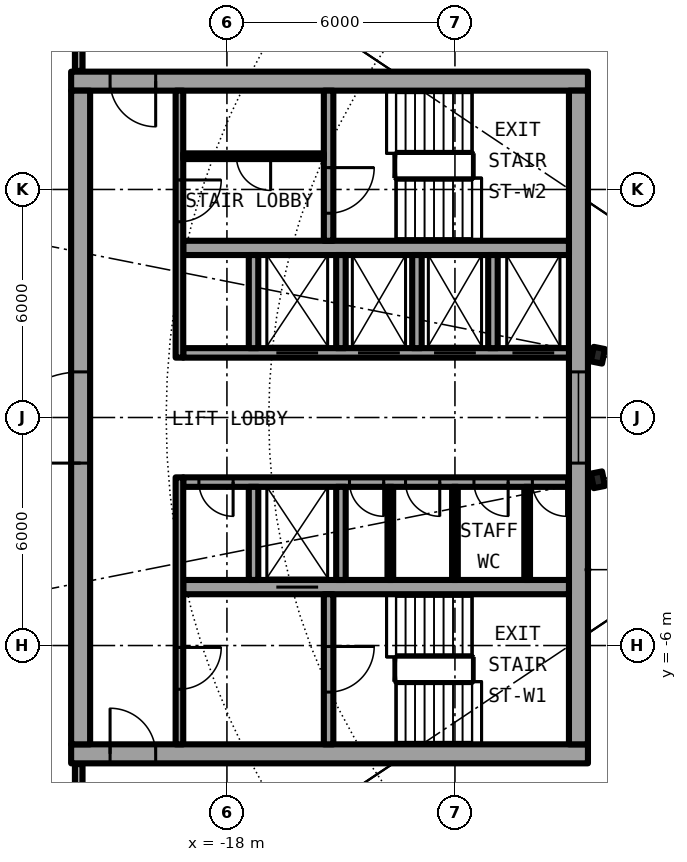
"""IFC4 building model, lengths in metres.
Left out: names, types, materials, properties, quantities, classifications, styles, units other than length and angle.
Written with IfcOpenShell. Run it as: python <this file> out.ifc"""

import sys

from ifc_helpers import new_model, si_unit, direction, frame, frame_2d, origin, origin_2d, place, context, subcontext, project, spatial, rectangle, i_section, extrude, element, fill, save


model = new_model("IFC4")
c1 = context("Model", 3, precision=1e-05, world=origin(), true_north=direction((0.0, 1.0)))
c2 = subcontext(c1, "Body", "Model", "MODEL_VIEW")
j1 = project(units=[si_unit("LENGTHUNIT", "METRE"), si_unit("PLANEANGLEUNIT", "RADIAN")], contexts=[c1])
p1 = place(None, origin())
s1 = spatial("IfcSite", under=j1, at=p1, CompositionType="ELEMENT")
p2 = place(p1, origin())
s2 = spatial("IfcBuilding", under=s1, at=p2, CompositionType="ELEMENT")
p3 = place(p2, frame((0.0, 0.0, 179.9)))
s3 = spatial("IfcBuildingStorey", under=s2, at=p3, CompositionType="ELEMENT", Elevation=179.9)
for number, where, z_axis, x_axis in (
    (1, (-8.239, 1.639, 0.0), (0.0, 0.0, 1.0), (-0.981, 0.195, 0.0)),
    (2, (-8.239, -1.639, 0.0), (0.0, 0.0, 1.0), (-0.981, -0.195, 0.0)),
):
    element("IfcColumn", number, at=place(p3, frame(where, z_axis=z_axis, x_axis=x_axis)), inside=s3, PredefinedType="COLUMN", context=c2, shape_type="SweptSolid", body=[
        extrude(i_section(OverallWidth=0.3, OverallDepth=0.39, WebThickness=0.011, FlangeThickness=0.019, FilletRadius=0.027, at=origin_2d()), origin(), (0.0, 0.0, 1.0), 6.1),
    ])
p4 = place(p3, frame((-22.1, -8.85, 0.0), z_axis=(0.0, 0.0, 1.0), x_axis=(1.0, 0.0, 0.0)))
e3 = element("IfcWall", 3, at=p4, inside=s3, PredefinedType="SHEAR", context=c2, shape_type="SweptSolid", body=[
    extrude(rectangle(XDim=13.6, YDim=0.5, at=frame_2d((6.8, 0.0))), origin(), (0.0, 0.0, 1.0), 6.1),
])
p5 = place(p4, frame((1.025, 0.0, 0.0)))
e4 = element("IfcOpeningElement", 4, at=p5, cuts=e3, PredefinedType="OPENING", context=c2, shape_type="SweptSolid", body=[
    extrude(rectangle(XDim=1.2, YDim=2.3, at=frame_2d((0.6, 1.15))), frame((0.0, 0.26, 0.0), z_axis=(0.0, -1.0, 0.0), x_axis=(1.0, 0.0, 0.0)), (0.0, 0.0, 1.0), 0.52),
])
p6 = place(p3, frame((-8.5, 8.85, 0.0), z_axis=(0.0, 0.0, 1.0), x_axis=(-1.0, 0.0, 0.0)))
e5 = element("IfcWall", 5, at=p6, inside=s3, PredefinedType="SHEAR", context=c2, shape_type="SweptSolid", body=[
    extrude(rectangle(XDim=13.6, YDim=0.5, at=frame_2d((6.8, 0.0))), origin(), (0.0, 0.0, 1.0), 6.1),
])
p7 = place(p6, frame((11.375, 0.0, 0.0)))
e6 = element("IfcOpeningElement", 6, at=p7, cuts=e5, PredefinedType="OPENING", context=c2, shape_type="SweptSolid", body=[
    extrude(rectangle(XDim=1.2, YDim=2.3, at=frame_2d((0.6, 1.15))), frame((0.0, 0.26, 0.0), z_axis=(0.0, -1.0, 0.0), x_axis=(1.0, 0.0, 0.0)), (0.0, 0.0, 1.0), 0.52),
])
p8 = place(p3, frame((-21.85, -8.6, 0.0), z_axis=(0.0, 0.0, 1.0), x_axis=(0.0, 1.0, 0.0)))
e7 = element("IfcWall", 7, at=p8, inside=s3, PredefinedType="SHEAR", context=c2, shape_type="SweptSolid", body=[
    extrude(rectangle(XDim=17.2, YDim=0.5, at=frame_2d((8.6, 0.0))), origin(), (0.0, 0.0, 1.0), 6.1),
])
p9 = place(p8, frame((7.4, 0.0, 0.0)))
e8 = element("IfcOpeningElement", 8, at=p9, cuts=e7, PredefinedType="OPENING", context=c2, shape_type="SweptSolid", body=[
    extrude(rectangle(XDim=2.4, YDim=2.3, at=frame_2d((1.2, 1.15))), frame((0.0, 0.26, 0.0), z_axis=(0.0, -1.0, 0.0), x_axis=(1.0, 0.0, 0.0)), (0.0, 0.0, 1.0), 0.52),
])
p10 = place(p3, frame((-8.75, 8.6, 0.0), z_axis=(0.0, 0.0, 1.0), x_axis=(0.0, -1.0, 0.0)))
e9 = element("IfcWall", 9, at=p10, inside=s3, PredefinedType="SHEAR", context=c2, shape_type="SweptSolid", body=[
    extrude(rectangle(XDim=17.2, YDim=0.5, at=frame_2d((8.6, 0.0))), origin(), (0.0, 0.0, 1.0), 6.1),
])
p11 = place(p10, frame((7.4, 0.0, 0.1)))
e10 = element("IfcOpeningElement", 10, at=p11, cuts=e9, PredefinedType="OPENING", context=c2, shape_type="SweptSolid", body=[
    extrude(rectangle(XDim=2.4, YDim=2.2, at=frame_2d((1.2, 1.1))), frame((0.0, 0.26, 0.0), z_axis=(0.0, -1.0, 0.0), x_axis=(1.0, 0.0, 0.0)), (0.0, 0.0, 1.0), 0.52),
])
p12 = place(p3, frame((-9.0, -1.7, 0.0), z_axis=(0.0, 0.0, 1.0), x_axis=(-1.0, 0.0, 0.0)))
e11 = element("IfcWall", 11, at=p12, inside=s3, PredefinedType="SHEAR", context=c2, shape_type="SweptSolid", body=[
    extrude(rectangle(XDim=10.15, YDim=0.25, at=frame_2d((5.075, 0.0))), origin(), (0.0, 0.0, 1.0), 6.1),
])
p13 = place(p12, frame((0.062, 0.0, 0.0)))
e12 = element("IfcOpeningElement", 12, at=p13, cuts=e11, PredefinedType="OPENING", context=c2, shape_type="SweptSolid", body=[
    extrude(rectangle(XDim=0.9, YDim=2.3, at=frame_2d((0.45, 1.15))), frame((0.0, 0.135, 0.0), z_axis=(0.0, -1.0, 0.0), x_axis=(1.0, 0.0, 0.0)), (0.0, 0.0, 1.0), 0.27),
])
p14 = place(p12, frame((1.6, 0.0, 0.0)))
e13 = element("IfcOpeningElement", 13, at=p14, cuts=e11, PredefinedType="OPENING", context=c2, shape_type="SweptSolid", body=[
    extrude(rectangle(XDim=0.9, YDim=2.3, at=frame_2d((0.45, 1.15))), frame((0.0, 0.135, 0.0), z_axis=(0.0, -1.0, 0.0), x_axis=(1.0, 0.0, 0.0)), (0.0, 0.0, 1.0), 0.27),
])
p15 = place(p12, frame((3.4, 0.0, 0.0)))
e14 = element("IfcOpeningElement", 14, at=p15, cuts=e11, PredefinedType="OPENING", context=c2, shape_type="SweptSolid", body=[
    extrude(rectangle(XDim=0.9, YDim=2.3, at=frame_2d((0.45, 1.15))), frame((0.0, 0.135, 0.0), z_axis=(0.0, -1.0, 0.0), x_axis=(1.0, 0.0, 0.0)), (0.0, 0.0, 1.0), 0.27),
])
p16 = place(p12, frame((4.875, 0.0, 0.0)))
e15 = element("IfcOpeningElement", 15, at=p16, cuts=e11, PredefinedType="OPENING", context=c2, shape_type="SweptSolid", body=[
    extrude(rectangle(XDim=0.9, YDim=2.3, at=frame_2d((0.45, 1.15))), frame((0.0, 0.135, 0.0), z_axis=(0.0, -1.0, 0.0), x_axis=(1.0, 0.0, 0.0)), (0.0, 0.0, 1.0), 0.27),
])
p17 = place(p12, frame((8.837, 0.0, 0.0)))
e16 = element("IfcOpeningElement", 16, at=p17, cuts=e11, PredefinedType="OPENING", context=c2, shape_type="SweptSolid", body=[
    extrude(rectangle(XDim=0.9, YDim=2.3, at=frame_2d((0.45, 1.15))), frame((0.0, 0.135, 0.0), z_axis=(0.0, -1.0, 0.0), x_axis=(1.0, 0.0, 0.0)), (0.0, 0.0, 1.0), 0.27),
])
p18 = place(p3, frame((-9.0, -4.462, 0.0), z_axis=(0.0, 0.0, 1.0), x_axis=(-1.0, 0.0, 0.0)))
e17 = element("IfcWall", 17, at=p18, inside=s3, PredefinedType="SHEAR", context=c2, shape_type="SweptSolid", body=[
    extrude(rectangle(XDim=10.15, YDim=0.375, at=frame_2d((5.075, 0.0))), origin(), (0.0, 0.0, 1.0), 6.1),
])
p19 = place(p18, frame((6.6, 0.0, 0.0)))
e18 = element("IfcOpeningElement", 18, at=p19, cuts=e17, PredefinedType="OPENING", context=c2, shape_type="SweptSolid", body=[
    extrude(rectangle(XDim=1.1, YDim=2.3, at=frame_2d((0.55, 1.15))), frame((0.0, 0.198, 0.0), z_axis=(0.0, -1.0, 0.0), x_axis=(1.0, 0.0, 0.0)), (0.0, 0.0, 1.0), 0.395),
])
p20 = place(p3, frame((-15.325, -4.65, 0.0), z_axis=(0.0, 0.0, 1.0), x_axis=(0.0, -1.0, 0.0)))
e19 = element("IfcWall", 19, at=p20, inside=s3, PredefinedType="SHEAR", context=c2, shape_type="SweptSolid", body=[
    extrude(rectangle(XDim=3.95, YDim=0.25, at=frame_2d((1.975, 0.0))), origin(), (0.0, 0.0, 1.0), 6.1),
])
p21 = place(p20, frame((1.375, 0.0, 0.0)))
e20 = element("IfcOpeningElement", 20, at=p21, cuts=e19, PredefinedType="OPENING", context=c2, shape_type="SweptSolid", body=[
    extrude(rectangle(XDim=1.2, YDim=2.3, at=frame_2d((0.6, 1.15))), frame((0.0, 0.135, 0.0), z_axis=(0.0, -1.0, 0.0), x_axis=(1.0, 0.0, 0.0)), (0.0, 0.0, 1.0), 0.27),
])
for number, where, z_axis, x_axis in (
    (21, (-15.0, -1.825, 0.0), (0.0, 0.0, 1.0), (0.0, -1.0, 0.0)),
    (22, (-17.3, -1.825, 0.0), (0.0, 0.0, 1.0), (0.0, -1.0, 0.0)),
):
    element("IfcWall", number, at=place(p3, frame(where, z_axis=z_axis, x_axis=x_axis)), inside=s3, PredefinedType="SOLIDWALL", context=c2, shape_type="SweptSolid", body=[
        extrude(rectangle(XDim=2.45, YDim=0.25, at=frame_2d((1.225, 0.0))), origin(), (0.0, 0.0, 1.0), 5.7),
    ])
p22 = place(p3, frame((-19.25, -1.575, 0.0), z_axis=(0.0, 0.0, 1.0), x_axis=(0.0, -1.0, 0.0)))
e23 = element("IfcWall", 23, at=p22, inside=s3, PredefinedType="SOLIDWALL", context=c2, shape_type="SweptSolid", body=[
    extrude(rectangle(XDim=7.025, YDim=0.2, at=frame_2d((3.513, 0.0))), origin(), (0.0, 0.0, 1.0), 5.7),
])
p23 = place(p22, frame((4.475, 0.0, 0.0)))
e24 = element("IfcOpeningElement", 24, at=p23, cuts=e23, PredefinedType="OPENING", context=c2, shape_type="SweptSolid", body=[
    extrude(rectangle(XDim=1.1, YDim=2.3, at=frame_2d((0.55, 1.15))), frame((0.0, 0.11, 0.0), z_axis=(0.0, -1.0, 0.0), x_axis=(1.0, 0.0, 0.0)), (0.0, 0.0, 1.0), 0.22),
])
p24 = place(p3, frame((-9.0, 1.7, 0.0), z_axis=(0.0, 0.0, 1.0), x_axis=(-1.0, 0.0, 0.0)))
e25 = element("IfcWall", 25, at=p24, inside=s3, PredefinedType="SHEAR", context=c2, shape_type="SweptSolid", body=[
    extrude(rectangle(XDim=10.15, YDim=0.25, at=frame_2d((5.075, 0.0))), origin(), (0.0, 0.0, 1.0), 6.1),
])
p25 = place(p24, frame((0.387, 0.0, 0.0)))
e26 = element("IfcOpeningElement", 26, at=p25, cuts=e25, PredefinedType="OPENING", context=c2, shape_type="SweptSolid", body=[
    extrude(rectangle(XDim=1.1, YDim=2.3, at=frame_2d((0.55, 1.15))), frame((0.0, 0.135, 0.0), z_axis=(0.0, -1.0, 0.0), x_axis=(1.0, 0.0, 0.0)), (0.0, 0.0, 1.0), 0.27),
])
p26 = place(p24, frame((2.45, 0.0, 0.0)))
e27 = element("IfcOpeningElement", 27, at=p26, cuts=e25, PredefinedType="OPENING", context=c2, shape_type="SweptSolid", body=[
    extrude(rectangle(XDim=1.1, YDim=2.3, at=frame_2d((0.55, 1.15))), frame((0.0, 0.135, 0.0), z_axis=(0.0, -1.0, 0.0), x_axis=(1.0, 0.0, 0.0)), (0.0, 0.0, 1.0), 0.27),
])
p27 = place(p24, frame((4.45, 0.0, 0.0)))
e28 = element("IfcOpeningElement", 28, at=p27, cuts=e25, PredefinedType="OPENING", context=c2, shape_type="SweptSolid", body=[
    extrude(rectangle(XDim=1.1, YDim=2.3, at=frame_2d((0.55, 1.15))), frame((0.0, 0.135, 0.0), z_axis=(0.0, -1.0, 0.0), x_axis=(1.0, 0.0, 0.0)), (0.0, 0.0, 1.0), 0.27),
])
p28 = place(p24, frame((6.6, 0.0, 0.0)))
e29 = element("IfcOpeningElement", 29, at=p28, cuts=e25, PredefinedType="OPENING", context=c2, shape_type="SweptSolid", body=[
    extrude(rectangle(XDim=1.1, YDim=2.3, at=frame_2d((0.55, 1.15))), frame((0.0, 0.135, 0.0), z_axis=(0.0, -1.0, 0.0), x_axis=(1.0, 0.0, 0.0)), (0.0, 0.0, 1.0), 0.27),
])
p29 = place(p3, frame((-9.0, 4.462, 0.0), z_axis=(0.0, 0.0, 1.0), x_axis=(-1.0, 0.0, 0.0)))
e30 = element("IfcWall", 30, at=p29, inside=s3, PredefinedType="SHEAR", context=c2, shape_type="SweptSolid", body=[
    extrude(rectangle(XDim=10.15, YDim=0.375, at=frame_2d((5.075, 0.0))), origin(), (0.0, 0.0, 1.0), 6.1),
])
p30 = place(p3, frame((-15.325, 8.6, 0.0), z_axis=(0.0, 0.0, 1.0), x_axis=(0.0, -1.0, 0.0)))
e31 = element("IfcWall", 31, at=p30, inside=s3, PredefinedType="SHEAR", context=c2, shape_type="SweptSolid", body=[
    extrude(rectangle(XDim=3.95, YDim=0.25, at=frame_2d((1.975, 0.0))), origin(), (0.0, 0.0, 1.0), 6.1),
])
p31 = place(p30, frame((2.025, 0.0, 0.0)))
e32 = element("IfcOpeningElement", 32, at=p31, cuts=e31, PredefinedType="OPENING", context=c2, shape_type="SweptSolid", body=[
    extrude(rectangle(XDim=1.2, YDim=2.3, at=frame_2d((0.6, 1.15))), frame((0.0, 0.135, 0.0), z_axis=(0.0, -1.0, 0.0), x_axis=(1.0, 0.0, 0.0)), (0.0, 0.0, 1.0), 0.27),
])
for number, where, z_axis, x_axis in (
    (33, (-15.0, 1.825, 0.0), (0.0, 0.0, 1.0), (0.0, 1.0, 0.0)),
    (34, (-17.3, 1.825, 0.0), (0.0, 0.0, 1.0), (0.0, 1.0, 0.0)),
):
    element("IfcWall", number, at=place(p3, frame(where, z_axis=z_axis, x_axis=x_axis)), inside=s3, PredefinedType="SOLIDWALL", context=c2, shape_type="SweptSolid", body=[
        extrude(rectangle(XDim=2.45, YDim=0.25, at=frame_2d((1.225, 0.0))), origin(), (0.0, 0.0, 1.0), 5.7),
    ])
p32 = place(p3, frame((-19.25, 8.6, 0.0), z_axis=(0.0, 0.0, 1.0), x_axis=(0.0, -1.0, 0.0)))
e35 = element("IfcWall", 35, at=p32, inside=s3, PredefinedType="SOLIDWALL", context=c2, shape_type="SweptSolid", body=[
    extrude(rectangle(XDim=7.025, YDim=0.2, at=frame_2d((3.513, 0.0))), origin(), (0.0, 0.0, 1.0), 5.7),
])
p33 = place(p32, frame((2.35, 0.0, 0.0)))
e36 = element("IfcOpeningElement", 36, at=p33, cuts=e35, PredefinedType="OPENING", context=c2, shape_type="SweptSolid", body=[
    extrude(rectangle(XDim=1.1, YDim=2.3, at=frame_2d((0.55, 1.15))), frame((0.0, 0.11, 0.0), z_axis=(0.0, -1.0, 0.0), x_axis=(1.0, 0.0, 0.0)), (0.0, 0.0, 1.0), 0.22),
])
for number, where, z_axis, x_axis in (
    (37, (-11.0, 1.825, 0.0), (0.0, 0.0, 1.0), (0.0, 1.0, 0.0)),
    (38, (-13.0, 1.825, 0.0), (0.0, 0.0, 1.0), (0.0, 1.0, 0.0)),
):
    element("IfcWall", number, at=place(p3, frame(where, z_axis=z_axis, x_axis=x_axis)), inside=s3, PredefinedType="SOLIDWALL", context=c2, shape_type="SweptSolid", body=[
        extrude(rectangle(XDim=2.45, YDim=0.25, at=frame_2d((1.225, 0.0))), origin(), (0.0, 0.0, 1.0), 5.7),
    ])
for number, where, z_axis, x_axis in (
    (39, (-10.1, -1.825, 0.0), (0.0, 0.0, 1.0), (0.0, -1.0, 0.0)),
    (40, (-12.0, -1.825, 0.0), (0.0, 0.0, 1.0), (0.0, -1.0, 0.0)),
    (41, (-13.7, -1.825, 0.0), (0.0, 0.0, 1.0), (0.0, -1.0, 0.0)),
):
    element("IfcWall", number, at=place(p3, frame(where, z_axis=z_axis, x_axis=x_axis)), inside=s3, PredefinedType="PARTITIONING", context=c2, shape_type="SweptSolid", body=[
        extrude(rectangle(XDim=2.45, YDim=0.15, at=frame_2d((1.225, 0.0))), origin(), (0.0, 0.0, 1.0), 5.7),
    ])
p34 = place(p3, frame((-15.45, 6.875, 0.0), z_axis=(0.0, 0.0, 1.0), x_axis=(-1.0, 0.0, 0.0)))
e42 = element("IfcWall", 42, at=p34, inside=s3, PredefinedType="PARTITIONING", context=c2, shape_type="SweptSolid", body=[
    extrude(rectangle(XDim=3.7, YDim=0.15, at=frame_2d((1.85, 0.0))), origin(), (0.0, 0.0, 1.0), 5.7),
])
p35 = place(p34, frame((1.4, 0.0, 0.0)))
e43 = element("IfcOpeningElement", 43, at=p35, cuts=e42, PredefinedType="OPENING", context=c2, shape_type="SweptSolid", body=[
    extrude(rectangle(XDim=0.9, YDim=2.3, at=frame_2d((0.45, 1.15))), frame((0.0, 0.085, 0.0), z_axis=(0.0, -1.0, 0.0), x_axis=(1.0, 0.0, 0.0)), (0.0, 0.0, 1.0), 0.17),
])
p36 = place(p3, frame((-10.431, 25.183, 0.0), z_axis=(0.0, 0.0, 1.0), x_axis=(0.382491934833, -0.923958830137, 0.0)))
e44 = element("IfcWall", 44, at=p36, inside=s3, PredefinedType="PARTITIONING", context=c2, shape_type="SweptSolid", body=[
    extrude(rectangle(XDim=17.438, YDim=0.15, at=frame_2d((8.719, 0.0))), origin(), (0.0, 0.0, 1.0), 5.7),
])
for number, where, z_axis, x_axis in (
    (45, (-21.9, -12.52, 0.0), (0.0, 0.0, 1.0), (0.0, 1.0, 0.0)),
    (46, (-21.9, 9.12, 0.0), (0.0, 0.0, 1.0), (0.0, 1.0, 0.0)),
):
    element("IfcWall", number, at=place(p3, frame(where, z_axis=z_axis, x_axis=x_axis)), inside=s3, PredefinedType="PARTITIONING", context=c2, shape_type="SweptSolid", body=[
        extrude(rectangle(XDim=3.4, YDim=0.2, at=frame_2d((1.7, 0.0))), origin(), (0.0, 0.0, 1.0), 5.7),
    ])
p37 = place(p19, origin())
e47 = element("IfcDoor", 47, at=p37, inside=s3, OperationType="DOUBLE_DOOR_SLIDING", PredefinedType="DOOR", context=c2, shape_type="SweptSolid", body=[
    extrude(rectangle(XDim=1.1, YDim=2.3, at=frame_2d((0.55, 1.15))), frame((0.0, 0.025, 0.0), z_axis=(0.0, -1.0, 0.0), x_axis=(1.0, 0.0, 0.0)), (0.0, 0.0, 1.0), 0.05),
])
fill(e18, e47)
p38 = place(p25, origin())
e48 = element("IfcDoor", 48, at=p38, inside=s3, OperationType="DOUBLE_DOOR_SLIDING", PredefinedType="DOOR", context=c2, shape_type="SweptSolid", body=[
    extrude(rectangle(XDim=1.1, YDim=2.3, at=frame_2d((0.55, 1.15))), frame((0.0, 0.025, 0.0), z_axis=(0.0, -1.0, 0.0), x_axis=(1.0, 0.0, 0.0)), (0.0, 0.0, 1.0), 0.05),
])
fill(e26, e48)
p39 = place(p26, origin())
e49 = element("IfcDoor", 49, at=p39, inside=s3, OperationType="DOUBLE_DOOR_SLIDING", PredefinedType="DOOR", context=c2, shape_type="SweptSolid", body=[
    extrude(rectangle(XDim=1.1, YDim=2.3, at=frame_2d((0.55, 1.15))), frame((0.0, 0.025, 0.0), z_axis=(0.0, -1.0, 0.0), x_axis=(1.0, 0.0, 0.0)), (0.0, 0.0, 1.0), 0.05),
])
fill(e27, e49)
p40 = place(p27, origin())
e50 = element("IfcDoor", 50, at=p40, inside=s3, OperationType="DOUBLE_DOOR_SLIDING", PredefinedType="DOOR", context=c2, shape_type="SweptSolid", body=[
    extrude(rectangle(XDim=1.1, YDim=2.3, at=frame_2d((0.55, 1.15))), frame((0.0, 0.025, 0.0), z_axis=(0.0, -1.0, 0.0), x_axis=(1.0, 0.0, 0.0)), (0.0, 0.0, 1.0), 0.05),
])
fill(e28, e50)
p41 = place(p28, origin())
e51 = element("IfcDoor", 51, at=p41, inside=s3, OperationType="DOUBLE_DOOR_SLIDING", PredefinedType="DOOR", context=c2, shape_type="SweptSolid", body=[
    extrude(rectangle(XDim=1.1, YDim=2.3, at=frame_2d((0.55, 1.15))), frame((0.0, 0.025, 0.0), z_axis=(0.0, -1.0, 0.0), x_axis=(1.0, 0.0, 0.0)), (0.0, 0.0, 1.0), 0.05),
])
fill(e29, e51)
p42 = place(p13, origin())
e52 = element("IfcDoor", 52, at=p42, inside=s3, OperationType="SINGLE_SWING_RIGHT", PredefinedType="DOOR", context=c2, shape_type="SweptSolid", body=[
    extrude(rectangle(XDim=0.9, YDim=2.3, at=frame_2d((0.45, 1.15))), frame((0.0, 0.025, 0.0), z_axis=(0.0, -1.0, 0.0), x_axis=(1.0, 0.0, 0.0)), (0.0, 0.0, 1.0), 0.05),
])
fill(e12, e52)
p43 = place(p14, origin())
e53 = element("IfcDoor", 53, at=p43, inside=s3, OperationType="SINGLE_SWING_RIGHT", PredefinedType="DOOR", context=c2, shape_type="SweptSolid", body=[
    extrude(rectangle(XDim=0.9, YDim=2.3, at=frame_2d((0.45, 1.15))), frame((0.0, 0.025, 0.0), z_axis=(0.0, -1.0, 0.0), x_axis=(1.0, 0.0, 0.0)), (0.0, 0.0, 1.0), 0.05),
])
fill(e13, e53)
p44 = place(p15, origin())
e54 = element("IfcDoor", 54, at=p44, inside=s3, OperationType="SINGLE_SWING_RIGHT", PredefinedType="DOOR", context=c2, shape_type="SweptSolid", body=[
    extrude(rectangle(XDim=0.9, YDim=2.3, at=frame_2d((0.45, 1.15))), frame((0.0, 0.025, 0.0), z_axis=(0.0, -1.0, 0.0), x_axis=(1.0, 0.0, 0.0)), (0.0, 0.0, 1.0), 0.05),
])
fill(e14, e54)
p45 = place(p16, origin())
e55 = element("IfcDoor", 55, at=p45, inside=s3, OperationType="SINGLE_SWING_LEFT", PredefinedType="DOOR", context=c2, shape_type="SweptSolid", body=[
    extrude(rectangle(XDim=0.9, YDim=2.3, at=frame_2d((0.45, 1.15))), frame((0.0, 0.025, 0.0), z_axis=(0.0, -1.0, 0.0), x_axis=(1.0, 0.0, 0.0)), (0.0, 0.0, 1.0), 0.05),
])
fill(e15, e55)
p46 = place(p17, origin())
e56 = element("IfcDoor", 56, at=p46, inside=s3, OperationType="SINGLE_SWING_LEFT", PredefinedType="DOOR", context=c2, shape_type="SweptSolid", body=[
    extrude(rectangle(XDim=0.9, YDim=2.3, at=frame_2d((0.45, 1.15))), frame((0.0, 0.025, 0.0), z_axis=(0.0, -1.0, 0.0), x_axis=(1.0, 0.0, 0.0)), (0.0, 0.0, 1.0), 0.05),
])
fill(e16, e56)
p47 = place(p35, origin())
e57 = element("IfcDoor", 57, at=p47, inside=s3, OperationType="SINGLE_SWING_LEFT", PredefinedType="DOOR", context=c2, shape_type="SweptSolid", body=[
    extrude(rectangle(XDim=0.9, YDim=2.3, at=frame_2d((0.45, 1.15))), frame((0.0, 0.025, 0.0), z_axis=(0.0, -1.0, 0.0), x_axis=(1.0, 0.0, 0.0)), (0.0, 0.0, 1.0), 0.05),
])
fill(e43, e57)
p48 = place(p21, origin())
e58 = element("IfcDoor", 58, at=p48, inside=s3, OperationType="SINGLE_SWING_LEFT", PredefinedType="DOOR", context=c2, shape_type="SweptSolid", body=[
    extrude(rectangle(XDim=1.2, YDim=2.3, at=frame_2d((0.6, 1.15))), frame((0.0, 0.025, 0.0), z_axis=(0.0, -1.0, 0.0), x_axis=(1.0, 0.0, 0.0)), (0.0, 0.0, 1.0), 0.05),
])
fill(e20, e58)
p49 = place(p31, origin())
e59 = element("IfcDoor", 59, at=p49, inside=s3, OperationType="SINGLE_SWING_LEFT", PredefinedType="DOOR", context=c2, shape_type="SweptSolid", body=[
    extrude(rectangle(XDim=1.2, YDim=2.3, at=frame_2d((0.6, 1.15))), frame((0.0, 0.025, 0.0), z_axis=(0.0, -1.0, 0.0), x_axis=(1.0, 0.0, 0.0)), (0.0, 0.0, 1.0), 0.05),
])
fill(e32, e59)
p50 = place(p23, origin())
e60 = element("IfcDoor", 60, at=p50, inside=s3, OperationType="SINGLE_SWING_LEFT", PredefinedType="DOOR", context=c2, shape_type="SweptSolid", body=[
    extrude(rectangle(XDim=1.1, YDim=2.3, at=frame_2d((0.55, 1.15))), frame((0.0, 0.025, 0.0), z_axis=(0.0, -1.0, 0.0), x_axis=(1.0, 0.0, 0.0)), (0.0, 0.0, 1.0), 0.05),
])
fill(e24, e60)
p51 = place(p33, origin())
e61 = element("IfcDoor", 61, at=p51, inside=s3, OperationType="SINGLE_SWING_RIGHT", PredefinedType="DOOR", context=c2, shape_type="SweptSolid", body=[
    extrude(rectangle(XDim=1.1, YDim=2.3, at=frame_2d((0.55, 1.15))), frame((0.0, 0.025, 0.0), z_axis=(0.0, -1.0, 0.0), x_axis=(1.0, 0.0, 0.0)), (0.0, 0.0, 1.0), 0.05),
])
fill(e36, e61)
p52 = place(p5, origin())
e62 = element("IfcDoor", 62, at=p52, inside=s3, OperationType="SINGLE_SWING_RIGHT", PredefinedType="DOOR", context=c2, shape_type="SweptSolid", body=[
    extrude(rectangle(XDim=1.2, YDim=2.3, at=frame_2d((0.6, 1.15))), frame((0.0, 0.025, 0.0), z_axis=(0.0, -1.0, 0.0), x_axis=(1.0, 0.0, 0.0)), (0.0, 0.0, 1.0), 0.05),
])
fill(e4, e62)
p53 = place(p7, origin())
e63 = element("IfcDoor", 63, at=p53, inside=s3, OperationType="SINGLE_SWING_LEFT", PredefinedType="DOOR", context=c2, shape_type="SweptSolid", body=[
    extrude(rectangle(XDim=1.2, YDim=2.3, at=frame_2d((0.6, 1.15))), frame((0.0, 0.025, 0.0), z_axis=(0.0, -1.0, 0.0), x_axis=(1.0, 0.0, 0.0)), (0.0, 0.0, 1.0), 0.05),
])
fill(e6, e63)
p54 = place(p9, origin())
e64 = element("IfcDoor", 64, at=p54, inside=s3, OperationType="SINGLE_SWING_LEFT", PredefinedType="DOOR", context=c2, shape_type="SweptSolid", body=[
    extrude(rectangle(XDim=2.4, YDim=2.3, at=frame_2d((1.2, 1.15))), frame((0.0, 0.025, 0.0), z_axis=(0.0, -1.0, 0.0), x_axis=(1.0, 0.0, 0.0)), (0.0, 0.0, 1.0), 0.05),
])
fill(e8, e64)
p55 = place(p11, origin())
e65 = element("IfcWindow", 65, at=p55, inside=s3, PartitioningType="SINGLE_PANEL", PredefinedType="WINDOW", context=c2, shape_type="SweptSolid", body=[
    extrude(rectangle(XDim=2.4, YDim=2.2, at=frame_2d((1.2, 1.1))), frame((0.0, 0.03, 0.0), z_axis=(0.0, -1.0, 0.0), x_axis=(1.0, 0.0, 0.0)), (0.0, 0.0, 1.0), 0.06),
])
fill(e10, e65)
save(model, sys.argv[1])
